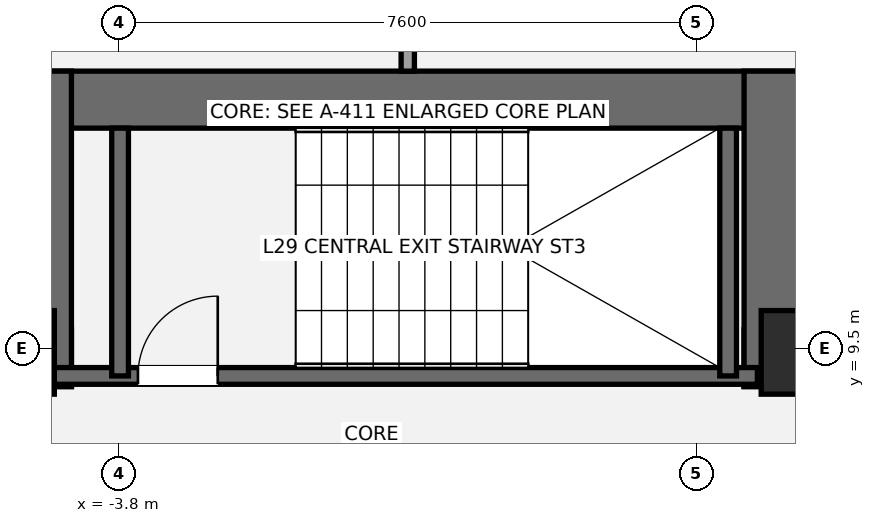
"""IFC4 building model, lengths in metres.
Left out: names, types, materials, properties, quantities, classifications, styles, units other than length and angle.
Written with IfcOpenShell. Run it as: python <this file> out.ifc"""

import sys

from ifc_helpers import new_model, si_unit, direction, frame, frame_2d, origin, origin_2d, place, context, subcontext, project, spatial, rectangle, extrude, element, fill, save


model = new_model("IFC4")
c1 = context("Model", 3, precision=1e-05, world=origin(), true_north=direction((0.0, 1.0)))
c2 = subcontext(c1, "Body", "Model", "MODEL_VIEW")
j1 = project(units=[si_unit("LENGTHUNIT", "METRE"), si_unit("PLANEANGLEUNIT", "RADIAN")], contexts=[c1])
p1 = place(None, origin())
s1 = spatial("IfcSite", under=j1, at=p1, CompositionType="ELEMENT")
p2 = place(p1, origin())
s2 = spatial("IfcBuilding", under=s1, at=p2, CompositionType="ELEMENT")
p3 = place(p2, frame((0.0, 0.0, 110.6)))
s3 = spatial("IfcBuildingStorey", under=s2, at=p3, CompositionType="ELEMENT", Elevation=110.6)
for number, where, z_axis, x_axis in (
    (1, (-13.9, 9.375, 0.0), (0.0, 0.0, 1.0), (1.0, 0.0, 0.0)),
    (2, (4.425, 9.375, 0.0), (0.0, 0.0, 1.0), (1.0, 0.0, 0.0)),
):
    element("IfcWall", number, at=place(p3, frame(where, z_axis=z_axis, x_axis=x_axis)), inside=s3, PredefinedType="SHEAR", context=c2, shape_type="SweptSolid", body=[
        extrude(rectangle(XDim=9.475, YDim=0.75, at=frame_2d((4.737, 0.0))), origin(), (0.0, 0.0, 1.0), 3.5),
    ])
p4 = place(p3, frame((-5.175, 12.775, 0.0), z_axis=(0.0, 0.0, 1.0), x_axis=(1.0, 0.0, 0.0)))
e3 = element("IfcWall", 3, at=p4, inside=s3, PredefinedType="SHEAR", context=c2, shape_type="SweptSolid", body=[
    extrude(rectangle(XDim=10.35, YDim=0.75, at=frame_2d((5.175, 0.0))), origin(), (0.0, 0.0, 1.0), 3.5),
])
for number, where, z_axis, x_axis in (
    (4, (-4.8, 9.0, 0.0), (0.0, 0.0, 1.0), (0.0, 1.0, 0.0)),
    (5, (4.8, 9.0, 0.0), (0.0, 0.0, 1.0), (0.0, 1.0, 0.0)),
):
    element("IfcWall", number, at=place(p3, frame(where, z_axis=z_axis, x_axis=x_axis)), inside=s3, PredefinedType="SHEAR", context=c2, shape_type="SweptSolid", body=[
        extrude(rectangle(XDim=4.15, YDim=0.75, at=frame_2d((2.075, 0.0))), origin(), (0.0, 0.0, 1.0), 3.5),
    ])
p5 = place(p3, frame((-4.7, 9.14, 0.0), z_axis=(0.0, 0.0, 1.0), x_axis=(1.0, 0.0, 0.0)))
e6 = element("IfcWall", 6, at=p5, inside=s3, PredefinedType="SHEAR", context=c2, shape_type="SweptSolid", body=[
    extrude(rectangle(XDim=9.3, YDim=0.22, at=frame_2d((4.65, 0.0))), origin(), (0.0, 0.0, 1.0), 3.5),
])
p6 = place(p5, frame((1.15, 0.0, 0.0)))
e7 = element("IfcOpeningElement", 7, at=p6, cuts=e6, PredefinedType="OPENING", context=c2, shape_type="SweptSolid", body=[
    extrude(rectangle(XDim=1.05, YDim=2.15, at=frame_2d((0.525, 1.075))), frame((0.0, 0.12, 0.0), z_axis=(0.0, -1.0, 0.0), x_axis=(1.0, 0.0, 0.0)), (0.0, 0.0, 1.0), 0.24),
])
for number, where, z_axis, x_axis in (
    (8, (-3.785, 9.14, 0.0), (0.0, 0.0, 1.0), (0.0, 1.0, 0.0)),
    (9, (4.215, 9.14, 0.0), (0.0, 0.0, 1.0), (0.0, 1.0, 0.0)),
):
    element("IfcWall", number, at=place(p3, frame(where, z_axis=z_axis, x_axis=x_axis)), inside=s3, PredefinedType="SHEAR", context=c2, shape_type="SweptSolid", body=[
        extrude(rectangle(XDim=3.26, YDim=0.22, at=frame_2d((1.63, 0.0))), origin(), (0.0, 0.0, 1.0), 3.5),
    ])
for number, where, z_axis, x_axis in (
    (10, (-5.2, 9.45, 0.0), (0.0, 0.0, 1.0), (1.0, 0.0, 0.0)),
    (11, (5.2, 9.45, 0.0), (0.0, 0.0, 1.0), (1.0, 0.0, 0.0)),
):
    element("IfcColumn", number, at=place(p3, frame(where, z_axis=z_axis, x_axis=x_axis)), inside=s3, PredefinedType="COLUMN", context=c2, shape_type="SweptSolid", body=[
        extrude(rectangle(XDim=1.1, YDim=1.1, at=origin_2d()), origin(), (0.0, 0.0, 1.0), 3.5),
    ])
p7 = place(p3, frame((0.0, 13.15, 0.0), z_axis=(0.0, 0.0, 1.0), x_axis=(0.0, 1.0, 0.0)))
e12 = element("IfcWall", 12, at=p7, inside=s3, PredefinedType="PARTITIONING", context=c2, shape_type="SweptSolid", body=[
    extrude(rectangle(XDim=5.19, YDim=0.175, at=frame_2d((2.595, 0.0))), origin(), (0.0, 0.0, 1.0), 2.763),
])
p8 = place(p6, origin())
e13 = element("IfcDoor", 13, at=p8, inside=s3, OperationType="SINGLE_SWING_RIGHT", PredefinedType="DOOR", context=c2, shape_type="SweptSolid", body=[
    extrude(rectangle(XDim=1.05, YDim=2.15, at=frame_2d((0.525, 1.075))), frame((0.0, 0.025, 0.0), z_axis=(0.0, -1.0, 0.0), x_axis=(1.0, 0.0, 0.0)), (0.0, 0.0, 1.0), 0.05),
])
fill(e7, e13)
save(model, sys.argv[1])
